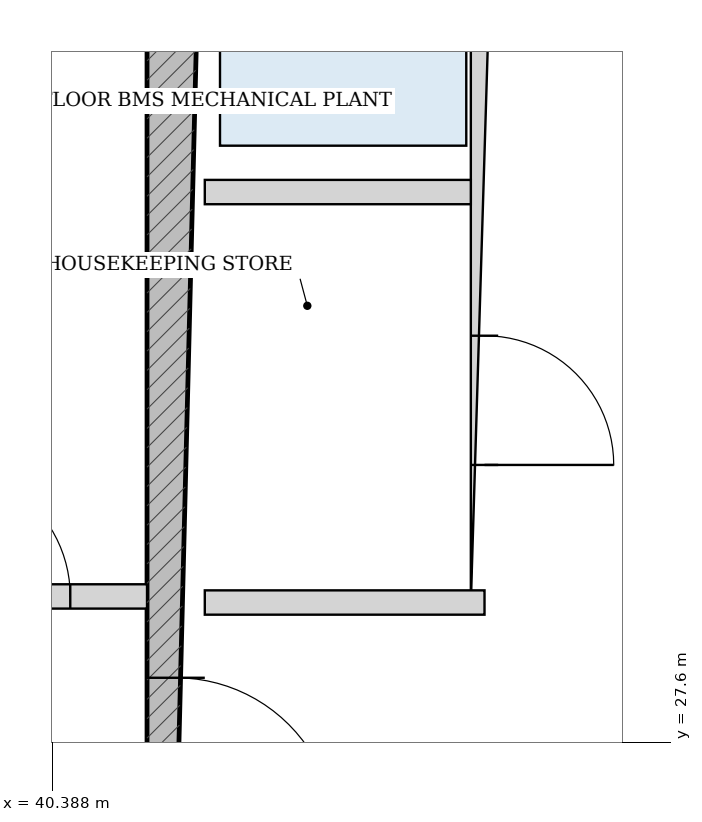
"""IFC4 building model, lengths in metres.
Left out: names, types, materials, properties, quantities, classifications, styles, units other than length and angle.
Written with IfcOpenShell. Run it as: python <this file> out.ifc"""

import sys

from ifc_helpers import new_model, si_unit, direction, frame, frame_2d, origin, place, context, subcontext, project, spatial, rectangle, extrude, source, transform, mapped, element, fill, save


model = new_model("IFC4")
c1 = context("Model", 3, precision=1e-05, world=origin(), true_north=direction((-0.2419218956, 0.970295726276)))
c2 = subcontext(c1, "Body", "Model", "MODEL_VIEW")
j1 = project(units=[si_unit("LENGTHUNIT", "METRE"), si_unit("PLANEANGLEUNIT", "RADIAN")], contexts=[c1])
p1 = place(None, origin())
s1 = spatial("IfcSite", under=j1, at=p1, CompositionType="ELEMENT")
p2 = place(p1, origin())
s2 = spatial("IfcBuilding", under=s1, at=p2, CompositionType="ELEMENT")
p3 = place(p2, frame((0.0, 0.0, 146.2)))
s3 = spatial("IfcBuildingStorey", under=s2, at=p3, CompositionType="ELEMENT", Elevation=146.2)
p4 = place(p3, frame((41.2, 19.175, 0.0), z_axis=(0.0, 0.0, 1.0), x_axis=(0.0, 1.0, 0.0)))
e1 = element("IfcWall", 1, at=p4, inside=s3, PredefinedType="SHEAR", context=c2, shape_type="SweptSolid", body=[
    extrude(rectangle(XDim=15.25, YDim=0.38, at=frame_2d((7.625, 0.0))), origin(), (0.0, 0.0, 1.0), 3.33),
])
p5 = place(p4, frame((7.8, 0.0, 0.0)))
e2 = element("IfcOpeningElement", 2, at=p5, cuts=e1, PredefinedType="OPENING", context=c2, shape_type="SweptSolid", body=[
    extrude(rectangle(XDim=1.05, YDim=2.15, at=frame_2d((0.525, 1.075))), frame((0.0, 0.2, 0.0), z_axis=(0.0, -1.0, 0.0), x_axis=(1.0, 0.0, 0.0)), (0.0, 0.0, 1.0), 0.4),
])
p6 = place(p3, frame((43.23, 28.52, 0.0), z_axis=(0.0, 0.0, 1.0), x_axis=(0.0, 1.0, 0.0)))
e3 = element("IfcWall", 3, at=p6, inside=s3, PredefinedType="PARTITIONING", context=c2, shape_type="SweptSolid", body=[
    extrude(rectangle(XDim=5.905, YDim=0.18, at=frame_2d((2.953, 0.0))), origin(), (0.0, 0.0, 1.0), 3.33),
])
p7 = place(p6, frame((0.905, 0.0, 0.0)))
e4 = element("IfcOpeningElement", 4, at=p7, cuts=e3, PredefinedType="OPENING", context=c2, shape_type="SweptSolid", body=[
    extrude(rectangle(XDim=0.85, YDim=2.1, at=frame_2d((0.425, 1.05))), frame((0.0, 0.1, 0.0), z_axis=(0.0, -1.0, 0.0), x_axis=(1.0, 0.0, 0.0)), (0.0, 0.0, 1.0), 0.2),
])
p8 = place(p6, frame((3.655, 0.0, 0.0)))
e5 = element("IfcOpeningElement", 5, at=p8, cuts=e3, PredefinedType="OPENING", context=c2, shape_type="SweptSolid", body=[
    extrude(rectangle(XDim=1.15, YDim=2.2, at=frame_2d((0.575, 1.1))), frame((0.0, 0.1, 0.0), z_axis=(0.0, -1.0, 0.0), x_axis=(1.0, 0.0, 0.0)), (0.0, 0.0, 1.0), 0.2),
])
p9 = place(p3, frame((41.39, 31.22, 0.0), z_axis=(0.0, 0.0, 1.0), x_axis=(1.0, 0.0, 0.0)))
e6 = element("IfcWall", 6, at=p9, inside=s3, PredefinedType="PARTITIONING", context=c2, shape_type="SweptSolid", body=[
    extrude(rectangle(XDim=1.75, YDim=0.16, at=frame_2d((0.875, 0.0))), origin(), (0.0, 0.0, 1.0), 3.33),
])
p10 = place(p3, frame((41.39, 28.52, 0.0), z_axis=(0.0, 0.0, 1.0), x_axis=(1.0, 0.0, 0.0)))
e7 = element("IfcWall", 7, at=p10, inside=s3, PredefinedType="PARTITIONING", context=c2, shape_type="SweptSolid", body=[
    extrude(rectangle(XDim=1.84, YDim=0.16, at=frame_2d((0.92, 0.0))), origin(), (0.0, 0.0, 1.0), 3.33),
])
p11 = place(p3, frame((34.99, 28.56, 0.0), z_axis=(0.0, 0.0, 1.0), x_axis=(1.0, 0.0, 0.0)))
e8 = element("IfcWall", 8, at=p11, inside=s3, PredefinedType="PARTITIONING", context=c2, shape_type="SweptSolid", body=[
    extrude(rectangle(XDim=6.02, YDim=0.16, at=frame_2d((3.01, 0.0))), origin(), (0.0, 0.0, 1.0), 3.33),
])
p12 = place(p11, frame((0.505, 0.0, 0.0)))
e9 = element("IfcOpeningElement", 9, at=p12, cuts=e8, PredefinedType="OPENING", context=c2, shape_type="SweptSolid", body=[
    extrude(rectangle(XDim=0.85, YDim=2.1, at=frame_2d((0.425, 1.05))), frame((0.0, 0.09, 0.0), z_axis=(0.0, -1.0, 0.0), x_axis=(1.0, 0.0, 0.0)), (0.0, 0.0, 1.0), 0.18),
])
p13 = place(p11, frame((2.58, 0.0, 0.0)))
e10 = element("IfcOpeningElement", 10, at=p13, cuts=e8, PredefinedType="OPENING", context=c2, shape_type="SweptSolid", body=[
    extrude(rectangle(XDim=0.86, YDim=2.1, at=frame_2d((0.43, 1.05))), frame((0.0, 0.09, 0.0), z_axis=(0.0, -1.0, 0.0), x_axis=(1.0, 0.0, 0.0)), (0.0, 0.0, 1.0), 0.18),
])
p14 = place(p11, frame((4.665, 0.0, 0.0)))
e11 = element("IfcOpeningElement", 11, at=p14, cuts=e8, PredefinedType="OPENING", context=c2, shape_type="SweptSolid", body=[
    extrude(rectangle(XDim=0.85, YDim=2.1, at=frame_2d((0.425, 1.05))), frame((0.0, 0.09, 0.0), z_axis=(0.0, -1.0, 0.0), x_axis=(1.0, 0.0, 0.0)), (0.0, 0.0, 1.0), 0.18),
])
m1 = source(origin(), c2, "Body", "SweptSolid", [
    extrude(rectangle(XDim=1.05, YDim=2.15, at=frame_2d((0.525, 1.075))), frame((0.0, 0.025, 0.0), z_axis=(0.0, -1.0, 0.0), x_axis=(1.0, 0.0, 0.0)), (0.0, 0.0, 1.0), 0.05),
])
p15 = place(p5, frame((1.05, 0.0, 0.0), z_axis=(0.0, 0.0, 1.0), x_axis=(-1.0, 0.0, 0.0)))
e12 = element("IfcDoor", 12, at=p15, inside=s3, OperationType="SINGLE_SWING_RIGHT", PredefinedType="DOOR", context=c2, shape_type="MappedRepresentation", body=[
    mapped(m1, transform((0.0, 0.0, 0.0), scale=1.0)),
])
fill(e2, e12)
m2 = source(origin(), c2, "Body", "SweptSolid", [
    extrude(rectangle(XDim=0.85, YDim=2.1, at=frame_2d((0.425, 1.05))), frame((0.0, 0.025, 0.0), z_axis=(0.0, -1.0, 0.0), x_axis=(1.0, 0.0, 0.0)), (0.0, 0.0, 1.0), 0.05),
])
p16 = place(p7, frame((0.85, 0.0, 0.0), z_axis=(0.0, 0.0, 1.0), x_axis=(-1.0, 0.0, 0.0)))
e13 = element("IfcDoor", 13, at=p16, inside=s3, OperationType="SINGLE_SWING_RIGHT", PredefinedType="DOOR", context=c2, shape_type="MappedRepresentation", body=[
    mapped(m2, transform((0.0, 0.0, 0.0), scale=1.0)),
])
fill(e4, e13)
p17 = place(p14, origin())
e14 = element("IfcDoor", 14, at=p17, inside=s3, OperationType="SINGLE_SWING_LEFT", PredefinedType="DOOR", context=c2, shape_type="MappedRepresentation", body=[
    mapped(m2, transform((0.0, 0.0, 0.0), scale=1.0)),
])
fill(e11, e14)
save(model, sys.argv[1])
